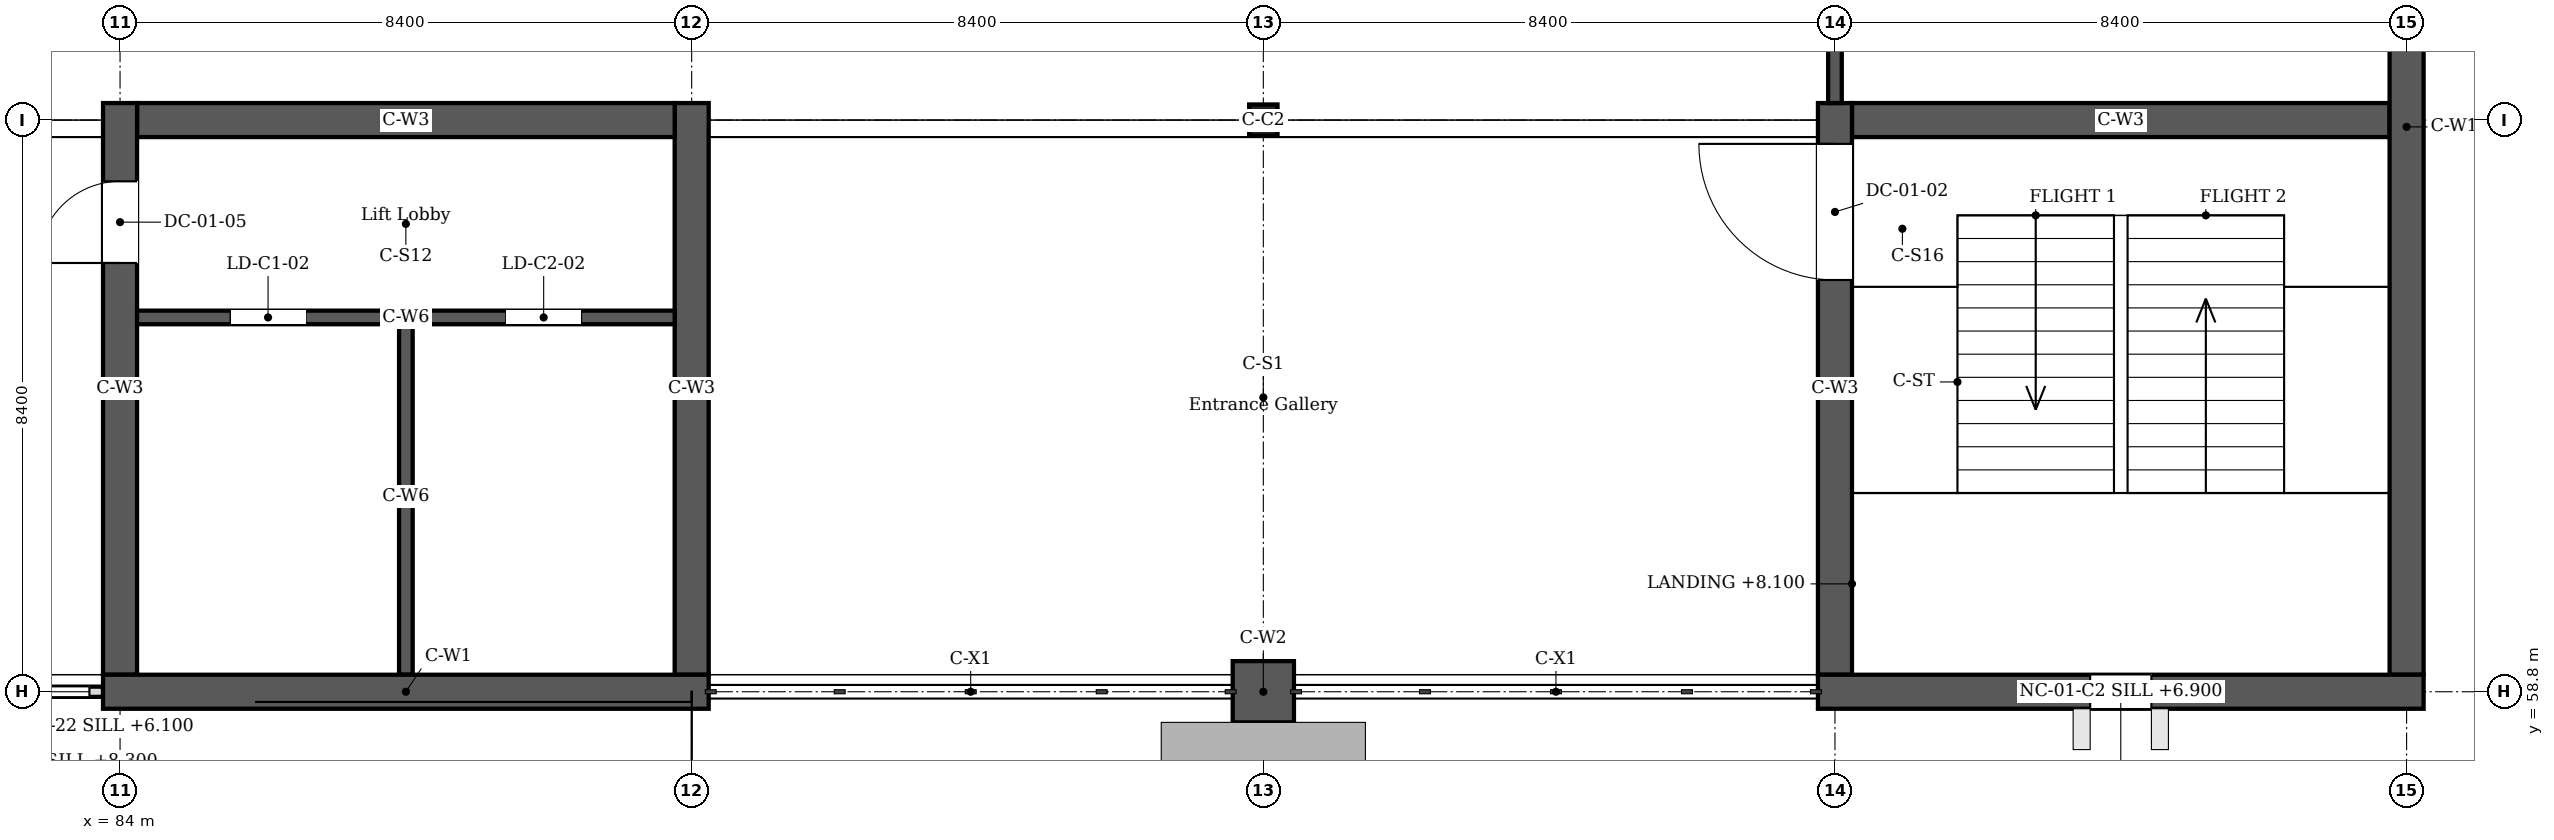
"""IFC4 building model, lengths in metres.
Left out: names, types, materials, properties, quantities, classifications, styles, units other than length and angle.
Written with IfcOpenShell. Run it as: python <this file> out.ifc"""

import sys

from ifc_helpers import new_model, si_unit, direction, frame, frame_2d, origin, origin_2d, place, context, subcontext, project, spatial, rectangle, i_section, extrude, element, fill, save


model = new_model("IFC4")
c1 = context("Model", 3, precision=1e-05, world=origin(), true_north=direction((0.0, 1.0)))
c2 = subcontext(c1, "Body", "Model", "MODEL_VIEW")
j1 = project(units=[si_unit("LENGTHUNIT", "METRE"), si_unit("PLANEANGLEUNIT", "RADIAN")], contexts=[c1])
p1 = place(None, origin())
s1 = spatial("IfcSite", under=j1, at=p1, CompositionType="ELEMENT")
p2 = place(p1, origin())
s2 = spatial("IfcBuilding", under=s1, at=p2, CompositionType="ELEMENT")
p3 = place(p2, frame((0.0, 0.0, 6.0)))
s3 = spatial("IfcBuildingStorey", under=s2, at=p3, CompositionType="ELEMENT", Elevation=6.0)
p4 = place(p3, frame((92.65, 58.8, 0.0), z_axis=(0.0, 0.0, 1.0), x_axis=(-1.0, 0.0, 0.0)))
e1 = element("IfcWall", 1, at=p4, inside=s3, PredefinedType="SOLIDWALL", context=c2, shape_type="SweptSolid", body=[
    extrude(rectangle(XDim=8.9, YDim=0.5, at=frame_2d((4.45, 0.0))), origin(), (0.0, 0.0, 1.0), 4.2),
])
p5 = place(p3, frame((117.85, 58.8, 0.0), z_axis=(0.0, 0.0, 1.0), x_axis=(-1.0, 0.0, 0.0)))
e2 = element("IfcWall", 2, at=p5, inside=s3, PredefinedType="SOLIDWALL", context=c2, shape_type="SweptSolid", body=[
    extrude(rectangle(XDim=8.9, YDim=0.5, at=frame_2d((4.45, 0.0))), origin(), (0.0, 0.0, 1.0), 4.2),
])
p6 = place(p5, frame((4.0, 0.0, 0.9)))
e3 = element("IfcOpeningElement", 3, at=p6, cuts=e2, PredefinedType="OPENING", context=c2, shape_type="SweptSolid", body=[
    extrude(rectangle(XDim=0.9, YDim=2.4, at=frame_2d((0.45, 1.2))), frame((0.0, 0.26, 0.0), z_axis=(0.0, -1.0, 0.0), x_axis=(1.0, 0.0, 0.0)), (0.0, 0.0, 1.0), 0.52),
])
p7 = place(p3, frame((100.35, 58.8, 0.0), z_axis=(0.0, 0.0, 1.0), x_axis=(1.0, 0.0, 0.0)))
e4 = element("IfcWall", 4, at=p7, inside=s3, PredefinedType="SOLIDWALL", context=c2, shape_type="SweptSolid", body=[
    extrude(rectangle(XDim=0.9, YDim=0.9, at=frame_2d((0.45, 0.0))), origin(), (0.0, 0.0, 1.0), 4.2),
])
p8 = place(p3, frame((117.6, 75.15, 0.0), z_axis=(0.0, 0.0, 1.0), x_axis=(0.0, -1.0, 0.0)))
e5 = element("IfcWall", 5, at=p8, inside=s3, PredefinedType="SOLIDWALL", context=c2, shape_type="SweptSolid", body=[
    extrude(rectangle(XDim=16.1, YDim=0.5, at=frame_2d((8.05, 0.0))), origin(), (0.0, 0.0, 1.0), 4.2),
])
p9 = place(p3, frame((100.8, 67.2, 0.0), z_axis=(0.0, 0.0, 1.0), x_axis=(1.0, 0.0, 0.0)))
e6 = element("IfcColumn", 6, at=p9, inside=s3, PredefinedType="COLUMN", context=c2, shape_type="SweptSolid", body=[
    extrude(i_section(OverallWidth=0.417, OverallDepth=0.458, WebThickness=0.03, FlangeThickness=0.05, FilletRadius=0.022, at=origin_2d()), origin(), (0.0, 0.0, 1.0), 4.2),
])
p10 = place(p3, frame((76.05, 58.8, 0.0), z_axis=(0.0, 0.0, 1.0), x_axis=(1.0, 0.0, 0.0)))
e7 = element("IfcWall", 7, at=p10, inside=s3, PredefinedType="SOLIDWALL", context=c2, shape_type="SweptSolid", body=[
    extrude(rectangle(XDim=7.7, YDim=0.15, at=frame_2d((3.85, 0.0))), origin(), (0.0, 0.0, 1.0), 4.2),
])
p11 = place(p10, frame((2.65, 0.0, 0.0)))
e8 = element("IfcOpeningElement", 8, at=p11, cuts=e7, PredefinedType="OPENING", context=c2, shape_type="SweptSolid", body=[
    extrude(rectangle(XDim=2.4, YDim=2.1, at=frame_2d((1.2, 1.05))), frame((0.0, 0.085, 0.0), z_axis=(0.0, -1.0, 0.0), x_axis=(1.0, 0.0, 0.0)), (0.0, 0.0, 1.0), 0.17),
])
p12 = place(p10, frame((0.2, 0.0, 0.1)))
e9 = element("IfcOpeningElement", 9, at=p12, cuts=e7, PredefinedType="OPENING", context=c2, shape_type="SweptSolid", body=[
    extrude(rectangle(XDim=2.25, YDim=3.6, at=frame_2d((1.125, 1.8))), frame((0.0, 0.085, 0.0), z_axis=(0.0, -1.0, 0.0), x_axis=(1.0, 0.0, 0.0)), (0.0, 0.0, 1.0), 0.17),
])
p13 = place(p10, frame((5.25, 0.0, 0.1)))
e10 = element("IfcOpeningElement", 10, at=p13, cuts=e7, PredefinedType="OPENING", context=c2, shape_type="SweptSolid", body=[
    extrude(rectangle(XDim=2.25, YDim=3.6, at=frame_2d((1.125, 1.8))), frame((0.0, 0.085, 0.0), z_axis=(0.0, -1.0, 0.0), x_axis=(1.0, 0.0, 0.0)), (0.0, 0.0, 1.0), 0.17),
])
p14 = place(p10, frame((2.65, 0.0, 2.3)))
e11 = element("IfcOpeningElement", 11, at=p14, cuts=e7, PredefinedType="OPENING", context=c2, shape_type="SweptSolid", body=[
    extrude(rectangle(XDim=2.4, YDim=1.6, at=frame_2d((1.2, 0.8))), frame((0.0, 0.085, 0.0), z_axis=(0.0, -1.0, 0.0), x_axis=(1.0, 0.0, 0.0)), (0.0, 0.0, 1.0), 0.17),
])
p15 = place(p3, frame((109.2, 59.05, 0.0), z_axis=(0.0, 0.0, 1.0), x_axis=(0.0, 1.0, 0.0)))
e12 = element("IfcWall", 12, at=p15, inside=s3, PredefinedType="SOLIDWALL", context=c2, shape_type="SweptSolid", body=[
    extrude(rectangle(XDim=8.4, YDim=0.5, at=frame_2d((4.2, 0.0))), origin(), (0.0, 0.0, 1.0), 4.2),
])
p16 = place(p15, frame((5.8, 0.0, 0.0)))
e13 = element("IfcOpeningElement", 13, at=p16, cuts=e12, PredefinedType="OPENING", context=c2, shape_type="SweptSolid", body=[
    extrude(rectangle(XDim=2.0, YDim=2.1, at=frame_2d((1.0, 1.05))), frame((0.0, 0.26, 0.0), z_axis=(0.0, -1.0, 0.0), x_axis=(1.0, 0.0, 0.0)), (0.0, 0.0, 1.0), 0.52),
])
p17 = place(p3, frame((109.45, 67.2, 0.0), z_axis=(0.0, 0.0, 1.0), x_axis=(1.0, 0.0, 0.0)))
e14 = element("IfcWall", 14, at=p17, inside=s3, PredefinedType="SOLIDWALL", context=c2, shape_type="SweptSolid", body=[
    extrude(rectangle(XDim=7.9, YDim=0.5, at=frame_2d((3.95, 0.0))), origin(), (0.0, 0.0, 1.0), 4.2),
])
p18 = place(p3, frame((92.4, 59.05, 0.0), z_axis=(0.0, 0.0, 1.0), x_axis=(0.0, 1.0, 0.0)))
e15 = element("IfcWall", 15, at=p18, inside=s3, PredefinedType="SOLIDWALL", context=c2, shape_type="SweptSolid", body=[
    extrude(rectangle(XDim=8.4, YDim=0.5, at=frame_2d((4.2, 0.0))), origin(), (0.0, 0.0, 1.0), 4.2),
])
p19 = place(p3, frame((84.0, 59.05, 0.0), z_axis=(0.0, 0.0, 1.0), x_axis=(0.0, 1.0, 0.0)))
e16 = element("IfcWall", 16, at=p19, inside=s3, PredefinedType="SOLIDWALL", context=c2, shape_type="SweptSolid", body=[
    extrude(rectangle(XDim=8.4, YDim=0.5, at=frame_2d((4.2, 0.0))), origin(), (0.0, 0.0, 1.0), 4.2),
])
p20 = place(p19, frame((6.05, 0.0, 0.0)))
e17 = element("IfcOpeningElement", 17, at=p20, cuts=e16, PredefinedType="OPENING", context=c2, shape_type="SweptSolid", body=[
    extrude(rectangle(XDim=1.2, YDim=2.1, at=frame_2d((0.6, 1.05))), frame((0.0, 0.26, 0.0), z_axis=(0.0, -1.0, 0.0), x_axis=(1.0, 0.0, 0.0)), (0.0, 0.0, 1.0), 0.52),
])
p21 = place(p3, frame((84.25, 67.2, 0.0), z_axis=(0.0, 0.0, 1.0), x_axis=(1.0, 0.0, 0.0)))
e18 = element("IfcWall", 18, at=p21, inside=s3, PredefinedType="SOLIDWALL", context=c2, shape_type="SweptSolid", body=[
    extrude(rectangle(XDim=7.9, YDim=0.5, at=frame_2d((3.95, 0.0))), origin(), (0.0, 0.0, 1.0), 4.2),
])
p22 = place(p3, frame((88.2, 59.05, 0.0), z_axis=(0.0, 0.0, 1.0), x_axis=(0.0, 1.0, 0.0)))
e19 = element("IfcWall", 19, at=p22, inside=s3, PredefinedType="PARTITIONING", context=c2, shape_type="SweptSolid", body=[
    extrude(rectangle(XDim=5.25, YDim=0.2, at=frame_2d((2.625, 0.0))), origin(), (0.0, 0.0, 1.0), 4.2),
])
p23 = place(p3, frame((84.25, 64.3, 0.0), z_axis=(0.0, 0.0, 1.0), x_axis=(1.0, 0.0, 0.0)))
e20 = element("IfcWall", 20, at=p23, inside=s3, PredefinedType="PARTITIONING", context=c2, shape_type="SweptSolid", body=[
    extrude(rectangle(XDim=7.9, YDim=0.2, at=frame_2d((3.95, 0.0))), origin(), (0.0, 0.0, 1.0), 4.2),
])
p24 = place(p23, frame((1.375, 0.0, 0.0)))
e21 = element("IfcOpeningElement", 21, at=p24, cuts=e20, PredefinedType="OPENING", context=c2, shape_type="SweptSolid", body=[
    extrude(rectangle(XDim=1.1, YDim=2.1, at=frame_2d((0.55, 1.05))), frame((0.0, 0.11, 0.0), z_axis=(0.0, -1.0, 0.0), x_axis=(1.0, 0.0, 0.0)), (0.0, 0.0, 1.0), 0.22),
])
p25 = place(p23, frame((5.425, 0.0, 0.0)))
e22 = element("IfcOpeningElement", 22, at=p25, cuts=e20, PredefinedType="OPENING", context=c2, shape_type="SweptSolid", body=[
    extrude(rectangle(XDim=1.1, YDim=2.1, at=frame_2d((0.55, 1.05))), frame((0.0, 0.11, 0.0), z_axis=(0.0, -1.0, 0.0), x_axis=(1.0, 0.0, 0.0)), (0.0, 0.0, 1.0), 0.22),
])
p26 = place(p3, frame((109.2, 67.45, 0.0), z_axis=(0.0, 0.0, 1.0), x_axis=(0.0, 1.0, 0.0)))
e23 = element("IfcWall", 23, at=p26, inside=s3, PredefinedType="PARTITIONING", context=c2, shape_type="SweptSolid", body=[
    extrude(rectangle(XDim=7.9, YDim=0.2, at=frame_2d((3.95, 0.0))), origin(), (0.0, 0.0, 1.0), 3.55),
])
p27 = place(p13, origin())
e24 = element("IfcWindow", 24, at=p27, inside=s3, PartitioningType="SINGLE_PANEL", PredefinedType="WINDOW", context=c2, shape_type="SweptSolid", body=[
    extrude(rectangle(XDim=2.25, YDim=3.6, at=frame_2d((1.125, 1.8))), frame((0.0, 0.03, 0.0), z_axis=(0.0, -1.0, 0.0), x_axis=(1.0, 0.0, 0.0)), (0.0, 0.0, 1.0), 0.06),
])
fill(e10, e24)
p28 = place(p6, origin())
e25 = element("IfcWindow", 25, at=p28, inside=s3, PartitioningType="SINGLE_PANEL", PredefinedType="WINDOW", context=c2, shape_type="SweptSolid", body=[
    extrude(rectangle(XDim=0.9, YDim=2.4, at=frame_2d((0.45, 1.2))), frame((0.0, 0.03, 0.0), z_axis=(0.0, -1.0, 0.0), x_axis=(1.0, 0.0, 0.0)), (0.0, 0.0, 1.0), 0.06),
])
fill(e3, e25)
p29 = place(p24, origin())
e26 = element("IfcDoor", 26, at=p29, inside=s3, OperationType="SLIDING_TO_LEFT", PredefinedType="DOOR", context=c2, shape_type="SweptSolid", body=[
    extrude(rectangle(XDim=1.1, YDim=2.1, at=frame_2d((0.55, 1.05))), frame((0.0, 0.025, 0.0), z_axis=(0.0, -1.0, 0.0), x_axis=(1.0, 0.0, 0.0)), (0.0, 0.0, 1.0), 0.05),
])
fill(e21, e26)
p30 = place(p25, origin())
e27 = element("IfcDoor", 27, at=p30, inside=s3, OperationType="SLIDING_TO_LEFT", PredefinedType="DOOR", context=c2, shape_type="SweptSolid", body=[
    extrude(rectangle(XDim=1.1, YDim=2.1, at=frame_2d((0.55, 1.05))), frame((0.0, 0.025, 0.0), z_axis=(0.0, -1.0, 0.0), x_axis=(1.0, 0.0, 0.0)), (0.0, 0.0, 1.0), 0.05),
])
fill(e22, e27)
p31 = place(p16, origin())
e28 = element("IfcDoor", 28, at=p31, inside=s3, OperationType="DOUBLE_DOOR_DOUBLE_SWING", PredefinedType="DOOR", context=c2, shape_type="SweptSolid", body=[
    extrude(rectangle(XDim=2.0, YDim=2.1, at=frame_2d((1.0, 1.05))), frame((0.0, 0.025, 0.0), z_axis=(0.0, -1.0, 0.0), x_axis=(1.0, 0.0, 0.0)), (0.0, 0.0, 1.0), 0.05),
])
fill(e13, e28)
p32 = place(p20, origin())
e29 = element("IfcDoor", 29, at=p32, inside=s3, OperationType="SINGLE_SWING_LEFT", PredefinedType="DOOR", context=c2, shape_type="SweptSolid", body=[
    extrude(rectangle(XDim=1.2, YDim=2.1, at=frame_2d((0.6, 1.05))), frame((0.0, 0.025, 0.0), z_axis=(0.0, -1.0, 0.0), x_axis=(1.0, 0.0, 0.0)), (0.0, 0.0, 1.0), 0.05),
])
fill(e17, e29)
save(model, sys.argv[1])
